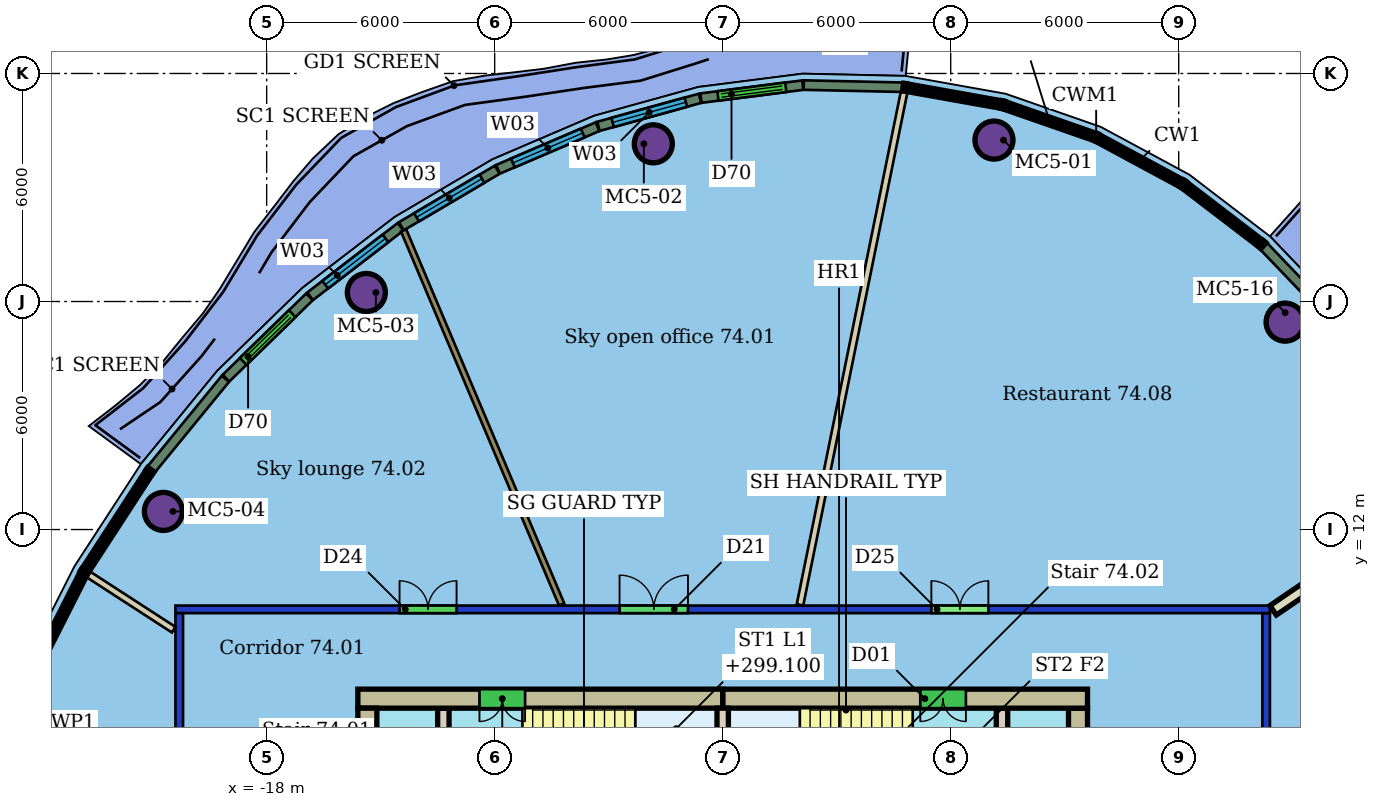
"""IFC4 building model, lengths in metres.
Left out: names, types, materials, properties, quantities, classifications, styles, units other than length and angle.
Written with IfcOpenShell. Run it as: python <this file> out.ifc"""

import sys

from ifc_helpers import new_model, si_unit, direction, frame, frame_2d, origin, origin_2d, place, context, subcontext, project, spatial, rectangle, hollow_circle, extrude, element, fill, save


model = new_model("IFC4")
c1 = context("Model", 3, precision=1e-05, world=origin(), true_north=direction((0.0, 1.0)))
c2 = subcontext(c1, "Body", "Model", "MODEL_VIEW")
j1 = project(units=[si_unit("LENGTHUNIT", "METRE"), si_unit("PLANEANGLEUNIT", "RADIAN")], contexts=[c1])
p1 = place(None, origin())
s1 = spatial("IfcSite", under=j1, at=p1, CompositionType="ELEMENT")
p2 = place(p1, origin())
s2 = spatial("IfcBuilding", under=s1, at=p2, CompositionType="ELEMENT")
p3 = place(p2, frame((0.0, 0.0, 297.3)))
s3 = spatial("IfcBuildingStorey", under=s2, at=p3, CompositionType="ELEMENT", Elevation=297.3)
for number, where, z_axis, x_axis in (
    (1, (1.138, 22.247, 0.0), (0.0, 0.0, 1.0), (1.0, 0.0, 0.0)),
    (2, (-7.825, 22.149, 0.0), (0.0, 0.0, 1.0), (1.0, 0.0, 0.0)),
    (3, (-15.377, 18.238, 0.0), (0.0, 0.0, 1.0), (1.0, 0.0, 0.0)),
    (4, (-20.718, 12.477, 0.0), (0.0, 0.0, 1.0), (1.0, 0.0, 0.0)),
    (5, (8.8, 17.457, 0.0), (0.0, 0.0, 1.0), (1.0, 0.0, 0.0)),
):
    element("IfcColumn", number, at=place(p3, frame(where, z_axis=z_axis, x_axis=x_axis)), inside=s3, PredefinedType="COLUMN", context=c2, shape_type="SweptSolid", body=[
        extrude(hollow_circle(Radius=0.5, WallThickness=0.04, at=origin_2d()), origin(), (0.0, 0.0, 1.0), 3.45),
    ])
p4 = place(p3, frame((-20.3, -9.8, 0.0), z_axis=(0.0, 0.0, 1.0), x_axis=(0.0, 1.0, 0.0)))
e6 = element("IfcWall", 6, at=p4, inside=s3, PredefinedType="PARTITIONING", context=c2, shape_type="SweptSolid", body=[
    extrude(rectangle(XDim=19.6, YDim=0.2, at=frame_2d((9.8, 0.0))), origin(), (0.0, 0.0, 1.0), 3.1),
])
p5 = place(p4, frame((12.164, 0.0, 0.0)))
e7 = element("IfcOpeningElement", 7, at=p5, cuts=e6, PredefinedType="OPENING", context=c2, shape_type="SweptSolid", body=[
    extrude(rectangle(XDim=1.5, YDim=2.4, at=frame_2d((0.75, 1.2))), frame((0.0, 0.11, 0.0), z_axis=(0.0, -1.0, 0.0), x_axis=(1.0, 0.0, 0.0)), (0.0, 0.0, 1.0), 0.22),
])
p6 = place(p3, frame((-20.4, 9.9, 0.0), z_axis=(0.0, 0.0, 1.0), x_axis=(1.0, 0.0, 0.0)))
e8 = element("IfcWall", 8, at=p6, inside=s3, PredefinedType="PARTITIONING", context=c2, shape_type="SweptSolid", body=[
    extrude(rectangle(XDim=28.8, YDim=0.2, at=frame_2d((14.4, 0.0))), origin(), (0.0, 0.0, 1.0), 3.1),
])
p7 = place(p6, frame((11.686, 0.0, 0.0)))
e9 = element("IfcOpeningElement", 9, at=p7, cuts=e8, PredefinedType="OPENING", context=c2, shape_type="SweptSolid", body=[
    extrude(rectangle(XDim=1.8, YDim=2.1, at=frame_2d((0.9, 1.05))), frame((0.0, 0.11, 0.0), z_axis=(0.0, -1.0, 0.0), x_axis=(1.0, 0.0, 0.0)), (0.0, 0.0, 1.0), 0.22),
])
p8 = place(p6, frame((5.897, 0.0, 0.0)))
e10 = element("IfcOpeningElement", 10, at=p8, cuts=e8, PredefinedType="OPENING", context=c2, shape_type="SweptSolid", body=[
    extrude(rectangle(XDim=1.5, YDim=2.1, at=frame_2d((0.75, 1.05))), frame((0.0, 0.11, 0.0), z_axis=(0.0, -1.0, 0.0), x_axis=(1.0, 0.0, 0.0)), (0.0, 0.0, 1.0), 0.22),
])
p9 = place(p6, frame((19.891, 0.0, 0.0)))
e11 = element("IfcOpeningElement", 11, at=p9, cuts=e8, PredefinedType="OPENING", context=c2, shape_type="SweptSolid", body=[
    extrude(rectangle(XDim=1.5, YDim=2.4, at=frame_2d((0.75, 1.2))), frame((0.0, 0.11, 0.0), z_axis=(0.0, -1.0, 0.0), x_axis=(1.0, 0.0, 0.0)), (0.0, 0.0, 1.0), 0.22),
])
p10 = place(p3, frame((8.3, 9.8, 0.0), z_axis=(0.0, 0.0, 1.0), x_axis=(0.0, -1.0, 0.0)))
e12 = element("IfcWall", 12, at=p10, inside=s3, PredefinedType="PARTITIONING", context=c2, shape_type="SweptSolid", body=[
    extrude(rectangle(XDim=19.6, YDim=0.2, at=frame_2d((9.8, 0.0))), origin(), (0.0, 0.0, 1.0), 3.1),
])
p11 = place(p10, frame((11.929, 0.0, 0.0)))
e13 = element("IfcOpeningElement", 13, at=p11, cuts=e12, PredefinedType="OPENING", context=c2, shape_type="SweptSolid", body=[
    extrude(rectangle(XDim=1.8, YDim=2.4, at=frame_2d((0.9, 1.2))), frame((0.0, 0.11, 0.0), z_axis=(0.0, -1.0, 0.0), x_axis=(1.0, 0.0, 0.0)), (0.0, 0.0, 1.0), 0.22),
])
p12 = place(p3, frame((-1.226, 23.512, 0.0), z_axis=(0.0, 0.0, 1.0), x_axis=(-0.19897585387, -0.980004392631, 0.0)))
e14 = element("IfcWall", 14, at=p12, inside=s3, PredefinedType="PARTITIONING", context=c2, shape_type="SweptSolid", body=[
    extrude(rectangle(XDim=13.771, YDim=0.175, at=frame_2d((6.885, 0.0))), origin(), (0.0, 0.0, 1.0), 3.45),
])
p13 = place(p3, frame((-14.396, 19.87, 0.0), z_axis=(0.0, 0.0, 1.0), x_axis=(0.3892448408, -0.921134330003, 0.0)))
e15 = element("IfcWall", 15, at=p13, inside=s3, PredefinedType="PARTITIONING", context=c2, shape_type="SweptSolid", body=[
    extrude(rectangle(XDim=10.683, YDim=0.15, at=frame_2d((5.342, 0.0))), origin(), (0.0, 0.0, 1.0), 3.45),
])
p14 = place(p3, frame((-22.691, 10.819, 0.0), z_axis=(0.0, 0.0, 1.0), x_axis=(0.839187719757, -0.543841862134, 0.0)))
e16 = element("IfcWall", 16, at=p14, inside=s3, PredefinedType="PARTITIONING", context=c2, shape_type="SweptSolid", body=[
    extrude(rectangle(XDim=2.673, YDim=0.175, at=frame_2d((1.337, 0.0))), origin(), (0.0, 0.0, 1.0), 3.45),
])
p15 = place(p3, frame((12.772, 12.797, 0.0), z_axis=(0.0, 0.0, 1.0), x_axis=(-0.826281084678, -0.563257995152, 0.0)))
e17 = element("IfcWall", 17, at=p15, inside=s3, PredefinedType="PARTITIONING", context=c2, shape_type="SweptSolid", body=[
    extrude(rectangle(XDim=5.19, YDim=0.3, at=frame_2d((2.595, 0.0))), origin(), (0.0, 0.0, 1.0), 3.45),
])
p16 = place(p3, frame((-1.269, 23.638, 0.0), z_axis=(0.0, 0.0, 1.0), x_axis=(-0.999760314133, 0.021893247481, 0.0)))
e18 = element("IfcWall", 18, at=p16, inside=s3, PredefinedType="SOLIDWALL", context=c2, shape_type="SweptSolid", body=[
    extrude(rectangle(XDim=2.598, YDim=0.25, at=frame_2d((1.299, 0.0))), origin(), (0.0, 0.0, 1.0), 3.15),
])
p17 = place(p3, frame((-3.893, 23.694, 0.0), z_axis=(0.0, 0.0, 1.0), x_axis=(-0.991933339644, -0.126760599962, 0.0)))
e19 = element("IfcWall", 19, at=p17, inside=s3, PredefinedType="SOLIDWALL", context=c2, shape_type="SweptSolid", body=[
    extrude(rectangle(XDim=2.7, YDim=0.25, at=frame_2d((1.35, 0.0))), origin(), (0.0, 0.0, 1.0), 3.15),
])
p18 = place(p17, frame((0.45, 0.0, 0.0)))
e20 = element("IfcOpeningElement", 20, at=p18, cuts=e19, PredefinedType="OPENING", context=c2, shape_type="SweptSolid", body=[
    extrude(rectangle(XDim=1.8, YDim=2.4, at=frame_2d((0.9, 1.2))), frame((0.0, 0.135, 0.0), z_axis=(0.0, -1.0, 0.0), x_axis=(1.0, 0.0, 0.0)), (0.0, 0.0, 1.0), 0.27),
])
p19 = place(p3, frame((-6.597, 23.346, 0.0), z_axis=(0.0, 0.0, 1.0), x_axis=(-0.963931868204, -0.266149118841, 0.0)))
e21 = element("IfcWall", 21, at=p19, inside=s3, PredefinedType="SOLIDWALL", context=c2, shape_type="SweptSolid", body=[
    extrude(rectangle(XDim=2.772, YDim=0.25, at=frame_2d((1.386, 0.0))), origin(), (0.0, 0.0, 1.0), 3.15),
])
p20 = place(p19, frame((0.386, 0.0, 0.9)))
e22 = element("IfcOpeningElement", 22, at=p20, cuts=e21, PredefinedType="OPENING", context=c2, shape_type="SweptSolid", body=[
    extrude(rectangle(XDim=2.0, YDim=2.1, at=frame_2d((1.0, 1.05))), frame((0.0, 0.135, 0.0), z_axis=(0.0, -1.0, 0.0), x_axis=(1.0, 0.0, 0.0)), (0.0, 0.0, 1.0), 0.27),
])
p21 = place(p3, frame((-9.292, 22.601, 0.0), z_axis=(0.0, 0.0, 1.0), x_axis=(-0.919251327093, -0.393671179586, 0.0)))
e23 = element("IfcWall", 23, at=p21, inside=s3, PredefinedType="SOLIDWALL", context=c2, shape_type="SweptSolid", body=[
    extrude(rectangle(XDim=2.85, YDim=0.25, at=frame_2d((1.425, 0.0))), origin(), (0.0, 0.0, 1.0), 3.15),
])
p22 = place(p21, frame((0.425, 0.0, 0.9)))
e24 = element("IfcOpeningElement", 24, at=p22, cuts=e23, PredefinedType="OPENING", context=c2, shape_type="SweptSolid", body=[
    extrude(rectangle(XDim=2.0, YDim=2.1, at=frame_2d((1.0, 1.05))), frame((0.0, 0.135, 0.0), z_axis=(0.0, -1.0, 0.0), x_axis=(1.0, 0.0, 0.0)), (0.0, 0.0, 1.0), 0.27),
])
p23 = place(p3, frame((-11.934, 21.468, 0.0), z_axis=(0.0, 0.0, 1.0), x_axis=(-0.861243352176, -0.508192766902, 0.0)))
e25 = element("IfcWall", 25, at=p23, inside=s3, PredefinedType="SOLIDWALL", context=c2, shape_type="SweptSolid", body=[
    extrude(rectangle(XDim=2.928, YDim=0.25, at=frame_2d((1.464, 0.0))), origin(), (0.0, 0.0, 1.0), 3.15),
])
p24 = place(p23, frame((0.464, 0.0, 0.9)))
e26 = element("IfcOpeningElement", 26, at=p24, cuts=e25, PredefinedType="OPENING", context=c2, shape_type="SweptSolid", body=[
    extrude(rectangle(XDim=2.0, YDim=2.1, at=frame_2d((1.0, 1.05))), frame((0.0, 0.135, 0.0), z_axis=(0.0, -1.0, 0.0), x_axis=(1.0, 0.0, 0.0)), (0.0, 0.0, 1.0), 0.27),
])
p25 = place(p3, frame((-14.475, 19.967, 0.0), z_axis=(0.0, 0.0, 1.0), x_axis=(-0.792959396459, -0.609274482944, 0.0)))
e27 = element("IfcWall", 27, at=p25, inside=s3, PredefinedType="SOLIDWALL", context=c2, shape_type="SweptSolid", body=[
    extrude(rectangle(XDim=3.002, YDim=0.25, at=frame_2d((1.501, 0.0))), origin(), (0.0, 0.0, 1.0), 3.15),
])
p26 = place(p25, frame((0.501, 0.0, 0.9)))
e28 = element("IfcOpeningElement", 28, at=p26, cuts=e27, PredefinedType="OPENING", context=c2, shape_type="SweptSolid", body=[
    extrude(rectangle(XDim=2.0, YDim=2.1, at=frame_2d((1.0, 1.05))), frame((0.0, 0.135, 0.0), z_axis=(0.0, -1.0, 0.0), x_axis=(1.0, 0.0, 0.0)), (0.0, 0.0, 1.0), 0.27),
])
p27 = place(p3, frame((-16.873, 18.122, 0.0), z_axis=(0.0, 0.0, 1.0), x_axis=(-0.716476423042, -0.697611306692, 0.0)))
e29 = element("IfcWall", 29, at=p27, inside=s3, PredefinedType="SOLIDWALL", context=c2, shape_type="SweptSolid", body=[
    extrude(rectangle(XDim=3.067, YDim=0.25, at=frame_2d((1.534, 0.0))), origin(), (0.0, 0.0, 1.0), 3.15),
])
p28 = place(p27, frame((0.634, 0.0, 0.0)))
e30 = element("IfcOpeningElement", 30, at=p28, cuts=e29, PredefinedType="OPENING", context=c2, shape_type="SweptSolid", body=[
    extrude(rectangle(XDim=1.8, YDim=2.4, at=frame_2d((0.9, 1.2))), frame((0.0, 0.135, 0.0), z_axis=(0.0, -1.0, 0.0), x_axis=(1.0, 0.0, 0.0)), (0.0, 0.0, 1.0), 0.27),
])
p29 = place(p3, frame((-19.086, 15.966, 0.0), z_axis=(0.0, 0.0, 1.0), x_axis=(-0.63346692687, -0.773769767154, 0.0)))
e31 = element("IfcWall", 31, at=p29, inside=s3, PredefinedType="SOLIDWALL", context=c2, shape_type="SweptSolid", body=[
    extrude(rectangle(XDim=3.075, YDim=0.25, at=frame_2d((1.537, 0.0))), origin(), (0.0, 0.0, 1.0), 3.15),
])
p30 = place(p3, frame((10.035, 17.576, 0.0), z_axis=(0.0, 0.0, 1.0), x_axis=(-0.691337834589, 0.722531659145, 0.0)))
e32 = element("IfcWall", 32, at=p30, inside=s3, PredefinedType="SOLIDWALL", context=c2, shape_type="SweptSolid", body=[
    extrude(rectangle(XDim=2.598, YDim=0.25, at=frame_2d((1.299, 0.0))), origin(), (0.0, 0.0, 1.0), 3.15),
])
p31 = place(p3, frame((3.6, 7.55, 0.0), z_axis=(0.0, 0.0, 1.0), x_axis=(-1.0, 0.0, 0.0)))
e33 = element("IfcWall", 33, at=p31, inside=s3, PredefinedType="SHEAR", context=c2, shape_type="SweptSolid", body=[
    extrude(rectangle(XDim=9.6, YDim=0.5, at=frame_2d((4.8, 0.0))), origin(), (0.0, 0.0, 1.0), 3.3),
])
p32 = place(p31, frame((3.2, 0.0, 0.0)))
e34 = element("IfcOpeningElement", 34, at=p32, cuts=e33, PredefinedType="OPENING", context=c2, shape_type="SweptSolid", body=[
    extrude(rectangle(XDim=1.2, YDim=2.1, at=frame_2d((0.6, 1.05))), frame((0.0, 0.26, 0.0), z_axis=(0.0, -1.0, 0.0), x_axis=(1.0, 0.0, 0.0)), (0.0, 0.0, 1.0), 0.52),
])
p33 = place(p3, frame((-6.0, 7.55, 0.0), z_axis=(0.0, 0.0, 1.0), x_axis=(-1.0, 0.0, 0.0)))
e35 = element("IfcWall", 35, at=p33, inside=s3, PredefinedType="SHEAR", context=c2, shape_type="SweptSolid", body=[
    extrude(rectangle(XDim=9.6, YDim=0.5, at=frame_2d((4.8, 0.0))), origin(), (0.0, 0.0, 1.0), 3.3),
])
p34 = place(p33, frame((5.2, 0.0, 0.0)))
e36 = element("IfcOpeningElement", 36, at=p34, cuts=e35, PredefinedType="OPENING", context=c2, shape_type="SweptSolid", body=[
    extrude(rectangle(XDim=1.2, YDim=2.1, at=frame_2d((0.6, 1.05))), frame((0.0, 0.26, 0.0), z_axis=(0.0, -1.0, 0.0), x_axis=(1.0, 0.0, 0.0)), (0.0, 0.0, 1.0), 0.52),
])
p35 = place(p3, frame((-15.35, 7.3, 0.0), z_axis=(0.0, 0.0, 1.0), x_axis=(0.0, -1.0, 0.0)))
e37 = element("IfcWall", 37, at=p35, inside=s3, PredefinedType="SHEAR", context=c2, shape_type="SweptSolid", body=[
    extrude(rectangle(XDim=14.6, YDim=0.5, at=frame_2d((7.3, 0.0))), origin(), (0.0, 0.0, 1.0), 3.3),
])
p36 = place(p35, frame((10.6, 0.0, 0.0)))
e38 = element("IfcOpeningElement", 38, at=p36, cuts=e37, PredefinedType="OPENING", context=c2, shape_type="SweptSolid", body=[
    extrude(rectangle(XDim=1.2, YDim=2.1, at=frame_2d((0.6, 1.05))), frame((0.0, 0.26, 0.0), z_axis=(0.0, -1.0, 0.0), x_axis=(1.0, 0.0, 0.0)), (0.0, 0.0, 1.0), 0.52),
])
p37 = place(p35, frame((2.8, 0.0, 0.0)))
e39 = element("IfcOpeningElement", 39, at=p37, cuts=e37, PredefinedType="OPENING", context=c2, shape_type="SweptSolid", body=[
    extrude(rectangle(XDim=1.2, YDim=2.1, at=frame_2d((0.6, 1.05))), frame((0.0, 0.26, 0.0), z_axis=(0.0, -1.0, 0.0), x_axis=(1.0, 0.0, 0.0)), (0.0, 0.0, 1.0), 0.52),
])
p38 = place(p3, frame((3.35, -7.3, 0.0), z_axis=(0.0, 0.0, 1.0), x_axis=(0.0, 1.0, 0.0)))
e40 = element("IfcWall", 40, at=p38, inside=s3, PredefinedType="SHEAR", context=c2, shape_type="SweptSolid", body=[
    extrude(rectangle(XDim=14.6, YDim=0.5, at=frame_2d((7.3, 0.0))), origin(), (0.0, 0.0, 1.0), 3.3),
])
p39 = place(p38, frame((2.8, 0.0, 0.0)))
e41 = element("IfcOpeningElement", 41, at=p39, cuts=e40, PredefinedType="OPENING", context=c2, shape_type="SweptSolid", body=[
    extrude(rectangle(XDim=1.2, YDim=2.1, at=frame_2d((0.6, 1.05))), frame((0.0, 0.26, 0.0), z_axis=(0.0, -1.0, 0.0), x_axis=(1.0, 0.0, 0.0)), (0.0, 0.0, 1.0), 0.52),
])
p40 = place(p38, frame((10.6, 0.0, 0.0)))
e42 = element("IfcOpeningElement", 42, at=p40, cuts=e40, PredefinedType="OPENING", context=c2, shape_type="SweptSolid", body=[
    extrude(rectangle(XDim=1.2, YDim=2.1, at=frame_2d((0.6, 1.05))), frame((0.0, 0.26, 0.0), z_axis=(0.0, -1.0, 0.0), x_axis=(1.0, 0.0, 0.0)), (0.0, 0.0, 1.0), 0.52),
])
p41 = place(p3, frame((-13.35, 7.3, 0.0), z_axis=(0.0, 0.0, 1.0), x_axis=(0.0, -1.0, 0.0)))
e43 = element("IfcWall", 43, at=p41, inside=s3, PredefinedType="SHEAR", context=c2, shape_type="SweptSolid", body=[
    extrude(rectangle(XDim=14.6, YDim=0.3, at=frame_2d((7.3, 0.0))), origin(), (0.0, 0.0, 1.0), 3.3),
])
p42 = place(p41, frame((6.55, 0.0, 0.0)))
e44 = element("IfcOpeningElement", 44, at=p42, cuts=e43, PredefinedType="OPENING", context=c2, shape_type="SweptSolid", body=[
    extrude(rectangle(XDim=1.5, YDim=2.1, at=frame_2d((0.75, 1.05))), frame((0.0, 0.16, 0.0), z_axis=(0.0, -1.0, 0.0), x_axis=(1.0, 0.0, 0.0)), (0.0, 0.0, 1.0), 0.32),
])
p43 = place(p3, frame((1.35, -7.3, 0.0), z_axis=(0.0, 0.0, 1.0), x_axis=(0.0, 1.0, 0.0)))
e45 = element("IfcWall", 45, at=p43, inside=s3, PredefinedType="SHEAR", context=c2, shape_type="SweptSolid", body=[
    extrude(rectangle(XDim=14.6, YDim=0.3, at=frame_2d((7.3, 0.0))), origin(), (0.0, 0.0, 1.0), 3.3),
])
p44 = place(p43, frame((1.21, 0.0, 0.0)))
e46 = element("IfcOpeningElement", 46, at=p44, cuts=e45, PredefinedType="OPENING", context=c2, shape_type="SweptSolid", body=[
    extrude(rectangle(XDim=1.0, YDim=2.1, at=frame_2d((0.5, 1.05))), frame((0.0, 0.16, 0.0), z_axis=(0.0, -1.0, 0.0), x_axis=(1.0, 0.0, 0.0)), (0.0, 0.0, 1.0), 0.32),
])
p45 = place(p43, frame((6.55, 0.0, 0.0)))
e47 = element("IfcOpeningElement", 47, at=p45, cuts=e45, PredefinedType="OPENING", context=c2, shape_type="SweptSolid", body=[
    extrude(rectangle(XDim=1.5, YDim=2.1, at=frame_2d((0.75, 1.05))), frame((0.0, 0.16, 0.0), z_axis=(0.0, -1.0, 0.0), x_axis=(1.0, 0.0, 0.0)), (0.0, 0.0, 1.0), 0.32),
])
p46 = place(p3, frame((-6.0, 3.88, 0.0), z_axis=(0.0, 0.0, 1.0), x_axis=(0.0, 1.0, 0.0)))
e48 = element("IfcWall", 48, at=p46, inside=s3, PredefinedType="SHEAR", context=c2, shape_type="SweptSolid", body=[
    extrude(rectangle(XDim=3.42, YDim=0.3, at=frame_2d((1.71, 0.0))), origin(), (0.0, 0.0, 1.0), 3.3),
])
p47 = place(p7, origin())
e49 = element("IfcDoor", 49, at=p47, inside=s3, OperationType="DOUBLE_DOOR_SINGLE_SWING", PredefinedType="DOOR", context=c2, shape_type="SweptSolid", body=[
    extrude(rectangle(XDim=1.8, YDim=2.1, at=frame_2d((0.9, 1.05))), frame((0.0, 0.025, 0.0), z_axis=(0.0, -1.0, 0.0), x_axis=(1.0, 0.0, 0.0)), (0.0, 0.0, 1.0), 0.05),
])
fill(e9, e49)
p48 = place(p8, origin())
e50 = element("IfcDoor", 50, at=p48, inside=s3, OperationType="DOUBLE_DOOR_SINGLE_SWING", PredefinedType="DOOR", context=c2, shape_type="SweptSolid", body=[
    extrude(rectangle(XDim=1.5, YDim=2.1, at=frame_2d((0.75, 1.05))), frame((0.0, 0.025, 0.0), z_axis=(0.0, -1.0, 0.0), x_axis=(1.0, 0.0, 0.0)), (0.0, 0.0, 1.0), 0.05),
])
fill(e10, e50)
p49 = place(p9, origin())
e51 = element("IfcDoor", 51, at=p49, inside=s3, OperationType="DOUBLE_DOOR_SINGLE_SWING", PredefinedType="DOOR", context=c2, shape_type="SweptSolid", body=[
    extrude(rectangle(XDim=1.5, YDim=2.4, at=frame_2d((0.75, 1.2))), frame((0.0, 0.025, 0.0), z_axis=(0.0, -1.0, 0.0), x_axis=(1.0, 0.0, 0.0)), (0.0, 0.0, 1.0), 0.05),
])
fill(e11, e51)
p50 = place(p18, origin())
e52 = element("IfcDoor", 52, at=p50, inside=s3, OperationType="DOUBLE_DOOR_SLIDING", PredefinedType="DOOR", context=c2, shape_type="SweptSolid", body=[
    extrude(rectangle(XDim=1.8, YDim=2.4, at=frame_2d((0.9, 1.2))), frame((0.0, 0.025, 0.0), z_axis=(0.0, -1.0, 0.0), x_axis=(1.0, 0.0, 0.0)), (0.0, 0.0, 1.0), 0.05),
])
fill(e20, e52)
p51 = place(p20, origin())
e53 = element("IfcWindow", 53, at=p51, inside=s3, PartitioningType="SINGLE_PANEL", PredefinedType="WINDOW", context=c2, shape_type="SweptSolid", body=[
    extrude(rectangle(XDim=2.0, YDim=2.1, at=frame_2d((1.0, 1.05))), frame((0.0, 0.03, 0.0), z_axis=(0.0, -1.0, 0.0), x_axis=(1.0, 0.0, 0.0)), (0.0, 0.0, 1.0), 0.06),
])
fill(e22, e53)
p52 = place(p22, origin())
e54 = element("IfcWindow", 54, at=p52, inside=s3, PartitioningType="SINGLE_PANEL", PredefinedType="WINDOW", context=c2, shape_type="SweptSolid", body=[
    extrude(rectangle(XDim=2.0, YDim=2.1, at=frame_2d((1.0, 1.05))), frame((0.0, 0.03, 0.0), z_axis=(0.0, -1.0, 0.0), x_axis=(1.0, 0.0, 0.0)), (0.0, 0.0, 1.0), 0.06),
])
fill(e24, e54)
p53 = place(p24, origin())
e55 = element("IfcWindow", 55, at=p53, inside=s3, PartitioningType="SINGLE_PANEL", PredefinedType="WINDOW", context=c2, shape_type="SweptSolid", body=[
    extrude(rectangle(XDim=2.0, YDim=2.1, at=frame_2d((1.0, 1.05))), frame((0.0, 0.03, 0.0), z_axis=(0.0, -1.0, 0.0), x_axis=(1.0, 0.0, 0.0)), (0.0, 0.0, 1.0), 0.06),
])
fill(e26, e55)
p54 = place(p26, origin())
e56 = element("IfcWindow", 56, at=p54, inside=s3, PartitioningType="SINGLE_PANEL", PredefinedType="WINDOW", context=c2, shape_type="SweptSolid", body=[
    extrude(rectangle(XDim=2.0, YDim=2.1, at=frame_2d((1.0, 1.05))), frame((0.0, 0.03, 0.0), z_axis=(0.0, -1.0, 0.0), x_axis=(1.0, 0.0, 0.0)), (0.0, 0.0, 1.0), 0.06),
])
fill(e28, e56)
p55 = place(p28, origin())
e57 = element("IfcDoor", 57, at=p55, inside=s3, OperationType="DOUBLE_DOOR_SLIDING", PredefinedType="DOOR", context=c2, shape_type="SweptSolid", body=[
    extrude(rectangle(XDim=1.8, YDim=2.4, at=frame_2d((0.9, 1.2))), frame((0.0, 0.025, 0.0), z_axis=(0.0, -1.0, 0.0), x_axis=(1.0, 0.0, 0.0)), (0.0, 0.0, 1.0), 0.05),
])
fill(e30, e57)
p56 = place(p32, origin())
e58 = element("IfcDoor", 58, at=p56, inside=s3, OperationType="DOUBLE_DOOR_SINGLE_SWING", PredefinedType="NOTDEFINED", context=c2, shape_type="SweptSolid", body=[
    extrude(rectangle(XDim=1.2, YDim=2.1, at=frame_2d((0.6, 1.05))), frame((0.0, 0.025, 0.0), z_axis=(0.0, -1.0, 0.0), x_axis=(1.0, 0.0, 0.0)), (0.0, 0.0, 1.0), 0.05),
])
fill(e34, e58)
p57 = place(p34, origin())
e59 = element("IfcDoor", 59, at=p57, inside=s3, OperationType="DOUBLE_DOOR_SINGLE_SWING", PredefinedType="NOTDEFINED", context=c2, shape_type="SweptSolid", body=[
    extrude(rectangle(XDim=1.2, YDim=2.1, at=frame_2d((0.6, 1.05))), frame((0.0, 0.025, 0.0), z_axis=(0.0, -1.0, 0.0), x_axis=(1.0, 0.0, 0.0)), (0.0, 0.0, 1.0), 0.05),
])
fill(e36, e59)
save(model, sys.argv[1])
